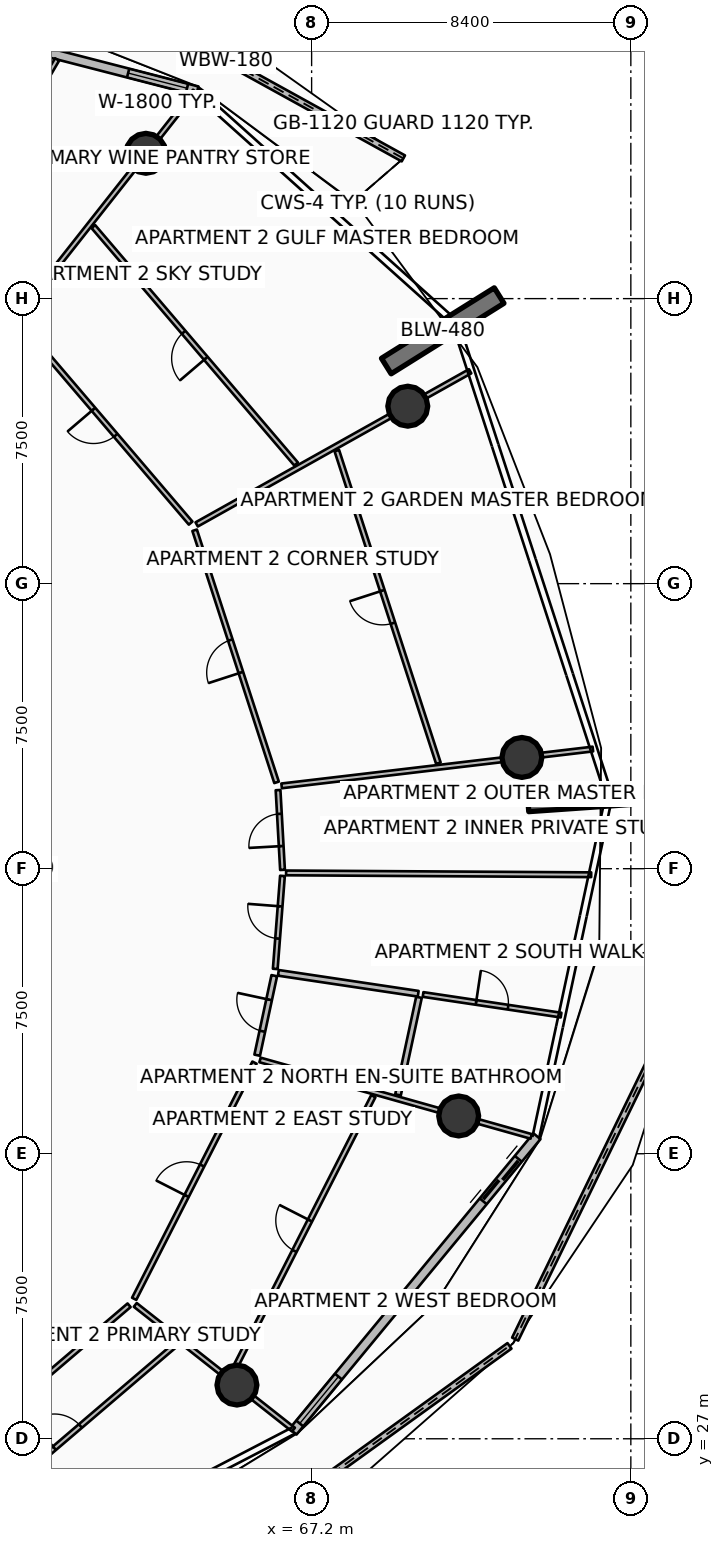
"""IFC4 building model, lengths in metres.
Left out: names, types, materials, properties, quantities, classifications, styles, units other than length and angle.
Written with IfcOpenShell. Run it as: python <this file> out.ifc"""

import sys

from ifc_helpers import new_model, si_unit, direction, frame, frame_2d, origin, origin_2d, place, context, subcontext, project, spatial, polyline, rectangle, circle, outline, extrude, element, fill, save


model = new_model("IFC4")
c1 = context("Model", 3, precision=1e-05, world=origin(), true_north=direction((0.0, 1.0)))
c2 = subcontext(c1, "Body", "Model", "MODEL_VIEW")
j1 = project(units=[si_unit("LENGTHUNIT", "METRE"), si_unit("PLANEANGLEUNIT", "RADIAN")], contexts=[c1])
p1 = place(None, origin())
s1 = spatial("IfcSite", under=j1, at=p1, CompositionType="ELEMENT")
p2 = place(p1, origin())
s2 = spatial("IfcBuilding", under=s1, at=p2, CompositionType="ELEMENT")
p3 = place(p2, frame((0.0, 0.0, 150.3)))
s3 = spatial("IfcBuildingStorey", under=s2, at=p3, CompositionType="ELEMENT", Elevation=150.3)
for number, where, z_axis, x_axis in (
    (1, (69.165, 55.226, 0.0), (0.0, 0.0, 1.0), (0.848, 0.53, 0.0)),
    (2, (72.897, 43.741, 0.0), (0.0, 0.0, 1.0), (0.998, 0.07, 0.0)),
):
    element("IfcWall", number, at=place(p3, frame(where, z_axis=z_axis, x_axis=x_axis)), inside=s3, PredefinedType="SOLIDWALL", context=c2, shape_type="SweptSolid", body=[
        extrude(rectangle(XDim=3.5, YDim=0.48, at=frame_2d((1.75, 0.0))), origin(), (0.0, 0.0, 1.0), 3.75),
    ])
for number, where, z_axis, x_axis in (
    (3, (69.73, 54.169, 0.0), (0.0, 0.0, 1.0), (1.0, 0.0, 0.0)),
    (4, (62.84, 60.824, 0.0), (0.0, 0.0, 1.0), (1.0, 0.0, 0.0)),
    (5, (65.234, 28.414, 0.0), (0.0, 0.0, 1.0), (1.0, 0.0, 0.0)),
    (6, (71.07, 35.494, 0.0), (0.0, 0.0, 1.0), (1.0, 0.0, 0.0)),
    (7, (72.733, 44.927, 0.0), (0.0, 0.0, 1.0), (1.0, 0.0, 0.0)),
):
    element("IfcColumn", number, at=place(p3, frame(where, z_axis=z_axis, x_axis=x_axis)), inside=s3, PredefinedType="COLUMN", context=c2, shape_type="SweptSolid", body=[
        extrude(circle(Radius=0.525, at=origin_2d()), origin(), (0.0, 0.0, 1.0), 3.5),
    ])
p4 = place(p3, frame((69.614, 60.689, 0.0), z_axis=(0.0, 0.0, 1.0), x_axis=(-0.875451711427, 0.483305597897, 0.0)))
e8 = element("IfcWall", 8, at=p4, inside=s3, PredefinedType="PARAPET", context=c2, shape_type="SweptSolid", body=[
    extrude(outline(polyline([(0.0, 0.0), (10.659, 0.0), (10.659, 1.148), (5.33, 1.127), (0.0, 1.224), (0.0, 0.0)])), frame((0.0, 0.09, 0.0), z_axis=(0.0, -1.0, 0.0), x_axis=(1.0, 0.0, 0.0)), (0.0, 0.0, 1.0), 0.18),
])
p5 = place(p3, frame((64.058, 23.43, 0.0), z_axis=(0.0, 0.0, 1.0), x_axis=(0.811363748486, 0.584541587608, 0.0)))
e9 = element("IfcWall", 9, at=p5, inside=s3, PredefinedType="PARAPET", context=c2, shape_type="SweptSolid", body=[
    extrude(outline(polyline([(0.0, 0.0), (10.29, 0.0), (10.29, 1.632), (5.145, 1.418), (0.0, 1.233), (0.0, 0.0)])), frame((0.0, 0.09, 0.0), z_axis=(0.0, -1.0, 0.0), x_axis=(1.0, 0.0, 0.0)), (0.0, 0.0, 1.0), 0.18),
])
p6 = place(p3, frame((72.556, 29.623, 0.0), z_axis=(0.0, 0.0, 1.0), x_axis=(0.437208925246, 0.899359970026, 0.0)))
e10 = element("IfcWall", 10, at=p6, inside=s3, PredefinedType="PARAPET", context=c2, shape_type="SweptSolid", body=[
    extrude(outline(polyline([(0.0, 0.0), (10.992, 0.0), (10.992, 1.86), (5.496, 1.798), (0.0, 1.632), (0.0, 0.0)])), frame((0.0, 0.09, 0.0), z_axis=(0.0, -1.0, 0.0), x_axis=(1.0, 0.0, 0.0)), (0.0, 0.0, 1.0), 0.18),
])
p7 = place(p3, frame((64.192, 62.466, 0.0), z_axis=(0.0, 0.0, 1.0), x_axis=(-0.968379685126, 0.249481032214, 0.0)))
e11 = element("IfcWall", 11, at=p7, inside=s3, PredefinedType="SOLIDWALL", context=c2, shape_type="SweptSolid", body=[
    extrude(rectangle(XDim=10.082, YDim=0.24, at=frame_2d((5.041, 0.0))), origin(), (0.0, 0.0, 1.0), 2.45),
])
p8 = place(p7, frame((7.862, 0.0, 0.0)))
e12 = element("IfcOpeningElement", 12, at=p8, cuts=e11, PredefinedType="OPENING", context=c2, shape_type="SweptSolid", body=[
    extrude(rectangle(XDim=1.45, YDim=2.15, at=frame_2d((0.725, 1.075))), frame((0.0, 0.13, 0.0), z_axis=(0.0, -1.0, 0.0), x_axis=(1.0, 0.0, 0.0)), (0.0, 0.0, 1.0), 0.26),
])
p9 = place(p7, frame((0.28, 0.0, 0.65)))
e13 = element("IfcOpeningElement", 13, at=p9, cuts=e11, PredefinedType="OPENING", context=c2, shape_type="SweptSolid", body=[
    extrude(rectangle(XDim=1.6, YDim=1.5, at=frame_2d((0.8, 0.75))), frame((0.0, 0.13, 0.0), z_axis=(0.0, -1.0, 0.0), x_axis=(1.0, 0.0, 0.0)), (0.0, 0.0, 1.0), 0.26),
])
p10 = place(p3, frame((66.709, 27.187, 0.0), z_axis=(0.0, 0.0, 1.0), x_axis=(0.636771922292, 0.77105221547, 0.0)))
e14 = element("IfcWall", 14, at=p10, inside=s3, PredefinedType="SOLIDWALL", context=c2, shape_type="SweptSolid", body=[
    extrude(rectangle(XDim=10.082, YDim=0.24, at=frame_2d((5.041, 0.0))), origin(), (0.0, 0.0, 1.0), 2.45),
])
p11 = place(p10, frame((7.862, 0.0, 0.0)))
e15 = element("IfcOpeningElement", 15, at=p11, cuts=e14, PredefinedType="OPENING", context=c2, shape_type="SweptSolid", body=[
    extrude(rectangle(XDim=1.45, YDim=2.15, at=frame_2d((0.725, 1.075))), frame((0.0, 0.13, 0.0), z_axis=(0.0, -1.0, 0.0), x_axis=(1.0, 0.0, 0.0)), (0.0, 0.0, 1.0), 0.26),
])
p12 = place(p10, frame((0.28, 0.0, 0.65)))
e16 = element("IfcOpeningElement", 16, at=p12, cuts=e14, PredefinedType="OPENING", context=c2, shape_type="SweptSolid", body=[
    extrude(rectangle(XDim=1.6, YDim=1.5, at=frame_2d((0.8, 0.75))), frame((0.0, 0.13, 0.0), z_axis=(0.0, -1.0, 0.0), x_axis=(1.0, 0.0, 0.0)), (0.0, 0.0, 1.0), 0.26),
])
p13 = place(p3, frame((57.093, 25.983, 0.0), z_axis=(0.0, 0.0, 1.0), x_axis=(0.76040680935, 0.649447060425, 0.0)))
e17 = element("IfcWall", 17, at=p13, inside=s3, PredefinedType="PARTITIONING", context=c2, shape_type="SweptSolid", body=[
    extrude(rectangle(XDim=6.975, YDim=0.125, at=frame_2d((3.487, 0.0))), origin(), (0.0, 0.0, 1.0), 2.94),
])
p14 = place(p13, frame((3.037, 0.0, 0.0)))
e18 = element("IfcOpeningElement", 18, at=p14, cuts=e17, PredefinedType="OPENING", context=c2, shape_type="SweptSolid", body=[
    extrude(rectangle(XDim=0.9, YDim=2.08, at=frame_2d((0.45, 1.04))), frame((0.0, 0.073, 0.0), z_axis=(0.0, -1.0, 0.0), x_axis=(1.0, 0.0, 0.0)), (0.0, 0.0, 1.0), 0.145),
])
p15 = place(p3, frame((57.882, 24.574, 0.0), z_axis=(0.0, 0.0, 1.0), x_axis=(0.760417937401, 0.649434030891, 0.0)))
e19 = element("IfcWall", 19, at=p15, inside=s3, PredefinedType="PARTITIONING", context=c2, shape_type="SweptSolid", body=[
    extrude(rectangle(XDim=7.605, YDim=0.125, at=frame_2d((3.802, 0.0))), origin(), (0.0, 0.0, 1.0), 2.94),
])
p16 = place(p15, frame((3.352, 0.0, 0.0)))
e20 = element("IfcOpeningElement", 20, at=p16, cuts=e19, PredefinedType="OPENING", context=c2, shape_type="SweptSolid", body=[
    extrude(rectangle(XDim=0.9, YDim=2.08, at=frame_2d((0.45, 1.04))), frame((0.0, 0.073, 0.0), z_axis=(0.0, -1.0, 0.0), x_axis=(1.0, 0.0, 0.0)), (0.0, 0.0, 1.0), 0.145),
])
p17 = place(p3, frame((62.559, 30.523, 0.0), z_axis=(0.0, 0.0, 1.0), x_axis=(0.785319981095, -0.619090080112, 0.0)))
e21 = element("IfcWall", 21, at=p17, inside=s3, PredefinedType="PARTITIONING", context=c2, shape_type="SweptSolid", body=[
    extrude(rectangle(XDim=5.301, YDim=0.125, at=frame_2d((2.65, 0.0))), origin(), (0.0, 0.0, 1.0), 2.94),
])
p18 = place(p3, frame((62.531, 30.683, 0.0), z_axis=(0.0, 0.0, 1.0), x_axis=(0.453977694262, 0.891013048789, 0.0)))
e22 = element("IfcWall", 22, at=p18, inside=s3, PredefinedType="PARTITIONING", context=c2, shape_type="SweptSolid", body=[
    extrude(rectangle(XDim=6.974, YDim=0.125, at=frame_2d((3.487, 0.0))), origin(), (0.0, 0.0, 1.0), 2.94),
])
p19 = place(p18, frame((3.037, 0.0, 0.0)))
e23 = element("IfcOpeningElement", 23, at=p19, cuts=e22, PredefinedType="OPENING", context=c2, shape_type="SweptSolid", body=[
    extrude(rectangle(XDim=0.9, YDim=2.08, at=frame_2d((0.45, 1.04))), frame((0.0, 0.073, 0.0), z_axis=(0.0, -1.0, 0.0), x_axis=(1.0, 0.0, 0.0)), (0.0, 0.0, 1.0), 0.145),
])
p20 = place(p3, frame((65.082, 28.671, 0.0), z_axis=(0.0, 0.0, 1.0), x_axis=(0.454001657521, 0.891000838927, 0.0)))
e24 = element("IfcWall", 24, at=p20, inside=s3, PredefinedType="PARTITIONING", context=c2, shape_type="SweptSolid", body=[
    extrude(rectangle(XDim=8.242, YDim=0.125, at=frame_2d((4.121, 0.0))), origin(), (0.0, 0.0, 1.0), 2.94),
])
p21 = place(p20, frame((3.671, 0.0, 0.0)))
e25 = element("IfcOpeningElement", 25, at=p21, cuts=e24, PredefinedType="OPENING", context=c2, shape_type="SweptSolid", body=[
    extrude(rectangle(XDim=0.9, YDim=2.08, at=frame_2d((0.45, 1.04))), frame((0.0, 0.073, 0.0), z_axis=(0.0, -1.0, 0.0), x_axis=(1.0, 0.0, 0.0)), (0.0, 0.0, 1.0), 0.145),
])
p22 = place(p3, frame((65.843, 36.968, 0.0), z_axis=(0.0, 0.0, 1.0), x_axis=(0.962456736489, -0.271435131084, 0.0)))
e26 = element("IfcWall", 26, at=p22, inside=s3, PredefinedType="PARTITIONING", context=c2, shape_type="SweptSolid", body=[
    extrude(rectangle(XDim=7.412, YDim=0.125, at=frame_2d((3.706, 0.0))), origin(), (0.0, 0.0, 1.0), 2.94),
])
p23 = place(p3, frame((65.768, 37.093, 0.0), z_axis=(0.0, 0.0, 1.0), x_axis=(0.210136736931, 0.977672006243, 0.0)))
e27 = element("IfcWall", 27, at=p23, inside=s3, PredefinedType="PARTITIONING", context=c2, shape_type="SweptSolid", body=[
    extrude(rectangle(XDim=2.14, YDim=0.15, at=frame_2d((1.07, 0.0))), origin(), (0.0, 0.0, 1.0), 2.94),
])
p24 = place(p23, frame((0.645, 0.0, 0.0)))
e28 = element("IfcOpeningElement", 28, at=p24, cuts=e27, PredefinedType="OPENING", context=c2, shape_type="SweptSolid", body=[
    extrude(rectangle(XDim=0.85, YDim=2.06, at=frame_2d((0.425, 1.03))), frame((0.0, 0.085, 0.0), z_axis=(0.0, -1.0, 0.0), x_axis=(1.0, 0.0, 0.0)), (0.0, 0.0, 1.0), 0.17),
])
p25 = place(p3, frame((69.473, 36.048, 0.0), z_axis=(0.0, 0.0, 1.0), x_axis=(0.210074988051, 0.97768527625, 0.0)))
e29 = element("IfcWall", 29, at=p25, inside=s3, PredefinedType="PARTITIONING", context=c2, shape_type="SweptSolid", body=[
    extrude(rectangle(XDim=2.626, YDim=0.15, at=frame_2d((1.313, 0.0))), origin(), (0.0, 0.0, 1.0), 2.94),
])
p26 = place(p3, frame((66.325, 39.26, 0.0), z_axis=(0.0, 0.0, 1.0), x_axis=(0.988998843182, -0.147923250997, 0.0)))
e30 = element("IfcWall", 30, at=p26, inside=s3, PredefinedType="PARTITIONING", context=c2, shape_type="SweptSolid", body=[
    extrude(rectangle(XDim=3.72, YDim=0.15, at=frame_2d((1.86, 0.0))), origin(), (0.0, 0.0, 1.0), 2.94),
])
p27 = place(p3, frame((70.133, 38.69, 0.0), z_axis=(0.0, 0.0, 1.0), x_axis=(0.989002592366, -0.147898182183, 0.0)))
e31 = element("IfcWall", 31, at=p27, inside=s3, PredefinedType="PARTITIONING", context=c2, shape_type="SweptSolid", body=[
    extrude(rectangle(XDim=3.671, YDim=0.125, at=frame_2d((1.835, 0.0))), origin(), (0.0, 0.0, 1.0), 2.94),
])
p28 = place(p27, frame((1.411, 0.0, 0.0)))
e32 = element("IfcOpeningElement", 32, at=p28, cuts=e31, PredefinedType="OPENING", context=c2, shape_type="SweptSolid", body=[
    extrude(rectangle(XDim=0.85, YDim=2.06, at=frame_2d((0.425, 1.03))), frame((0.0, 0.073, 0.0), z_axis=(0.0, -1.0, 0.0), x_axis=(1.0, 0.0, 0.0)), (0.0, 0.0, 1.0), 0.145),
])
p29 = place(p3, frame((66.529, 41.889, 0.0), z_axis=(0.0, 0.0, 1.0), x_axis=(0.999982052634, -0.00599119444, 0.0)))
e33 = element("IfcWall", 33, at=p29, inside=s3, PredefinedType="PARTITIONING", context=c2, shape_type="SweptSolid", body=[
    extrude(rectangle(XDim=8.028, YDim=0.125, at=frame_2d((4.014, 0.0))), origin(), (0.0, 0.0, 1.0), 2.94),
])
p30 = place(p3, frame((66.243, 39.363, 0.0), z_axis=(0.0, 0.0, 1.0), x_axis=(0.077198584258, 0.99701573638, 0.0)))
e34 = element("IfcWall", 34, at=p30, inside=s3, PredefinedType="PARTITIONING", context=c2, shape_type="SweptSolid", body=[
    extrude(rectangle(XDim=2.454, YDim=0.125, at=frame_2d((1.227, 0.0))), origin(), (0.0, 0.0, 1.0), 2.94),
])
p31 = place(p30, frame((0.802, 0.0, 0.0)))
e35 = element("IfcOpeningElement", 35, at=p31, cuts=e34, PredefinedType="OPENING", context=c2, shape_type="SweptSolid", body=[
    extrude(rectangle(XDim=0.85, YDim=2.06, at=frame_2d((0.425, 1.03))), frame((0.0, 0.073, 0.0), z_axis=(0.0, -1.0, 0.0), x_axis=(1.0, 0.0, 0.0)), (0.0, 0.0, 1.0), 0.145),
])
p32 = place(p3, frame((66.434, 41.969, 0.0), z_axis=(0.0, 0.0, 1.0), x_axis=(-0.055766005986, 0.998443865511, 0.0)))
e36 = element("IfcWall", 36, at=p32, inside=s3, PredefinedType="PARTITIONING", context=c2, shape_type="SweptSolid", body=[
    extrude(rectangle(XDim=2.101, YDim=0.125, at=frame_2d((1.051, 0.0))), origin(), (0.0, 0.0, 1.0), 2.94),
])
p33 = place(p32, frame((0.626, 0.0, 0.0)))
e37 = element("IfcOpeningElement", 37, at=p33, cuts=e36, PredefinedType="OPENING", context=c2, shape_type="SweptSolid", body=[
    extrude(rectangle(XDim=0.85, YDim=2.06, at=frame_2d((0.425, 1.03))), frame((0.0, 0.073, 0.0), z_axis=(0.0, -1.0, 0.0), x_axis=(1.0, 0.0, 0.0)), (0.0, 0.0, 1.0), 0.145),
])
p34 = place(p3, frame((66.41, 44.179, 0.0), z_axis=(0.0, 0.0, 1.0), x_axis=(0.993070354128, 0.117521367213, 0.0)))
e38 = element("IfcWall", 38, at=p34, inside=s3, PredefinedType="PARTITIONING", context=c2, shape_type="SweptSolid", body=[
    extrude(rectangle(XDim=8.247, YDim=0.125, at=frame_2d((4.124, 0.0))), origin(), (0.0, 0.0, 1.0), 2.94),
])
p35 = place(p3, frame((66.277, 44.272, 0.0), z_axis=(0.0, 0.0, 1.0), x_axis=(-0.308993461661, 0.951064162215, 0.0)))
e39 = element("IfcWall", 39, at=p35, inside=s3, PredefinedType="PARTITIONING", context=c2, shape_type="SweptSolid", body=[
    extrude(rectangle(XDim=6.974, YDim=0.125, at=frame_2d((3.487, 0.0))), origin(), (0.0, 0.0, 1.0), 2.94),
])
p36 = place(p35, frame((3.037, 0.0, 0.0)))
e40 = element("IfcOpeningElement", 40, at=p36, cuts=e39, PredefinedType="OPENING", context=c2, shape_type="SweptSolid", body=[
    extrude(rectangle(XDim=0.9, YDim=2.08, at=frame_2d((0.45, 1.04))), frame((0.0, 0.073, 0.0), z_axis=(0.0, -1.0, 0.0), x_axis=(1.0, 0.0, 0.0)), (0.0, 0.0, 1.0), 0.145),
])
p37 = place(p3, frame((70.535, 44.776, 0.0), z_axis=(0.0, 0.0, 1.0), x_axis=(-0.309002443549, 0.951061244022, 0.0)))
e41 = element("IfcWall", 41, at=p37, inside=s3, PredefinedType="PARTITIONING", context=c2, shape_type="SweptSolid", body=[
    extrude(rectangle(XDim=8.647, YDim=0.125, at=frame_2d((4.324, 0.0))), origin(), (0.0, 0.0, 1.0), 2.94),
])
p38 = place(p37, frame((3.874, 0.0, 0.0)))
e42 = element("IfcOpeningElement", 42, at=p38, cuts=e41, PredefinedType="OPENING", context=c2, shape_type="SweptSolid", body=[
    extrude(rectangle(XDim=0.9, YDim=2.08, at=frame_2d((0.45, 1.04))), frame((0.0, 0.073, 0.0), z_axis=(0.0, -1.0, 0.0), x_axis=(1.0, 0.0, 0.0)), (0.0, 0.0, 1.0), 0.145),
])
p39 = place(p3, frame((64.175, 51.059, 0.0), z_axis=(0.0, 0.0, 1.0), x_axis=(0.872491881101, 0.488628608877, 0.0)))
e43 = element("IfcWall", 43, at=p39, inside=s3, PredefinedType="PARTITIONING", context=c2, shape_type="SweptSolid", body=[
    extrude(rectangle(XDim=8.247, YDim=0.125, at=frame_2d((4.124, 0.0))), origin(), (0.0, 0.0, 1.0), 2.94),
])
p40 = place(p3, frame((64.017, 51.093, 0.0), z_axis=(0.0, 0.0, 1.0), x_axis=(-0.649447060425, 0.76040680935, 0.0)))
e44 = element("IfcWall", 44, at=p40, inside=s3, PredefinedType="PARTITIONING", context=c2, shape_type="SweptSolid", body=[
    extrude(rectangle(XDim=6.975, YDim=0.125, at=frame_2d((3.487, 0.0))), origin(), (0.0, 0.0, 1.0), 2.94),
])
p41 = place(p40, frame((3.037, 0.0, 0.0)))
e45 = element("IfcOpeningElement", 45, at=p41, cuts=e44, PredefinedType="OPENING", context=c2, shape_type="SweptSolid", body=[
    extrude(rectangle(XDim=0.9, YDim=2.08, at=frame_2d((0.45, 1.04))), frame((0.0, 0.073, 0.0), z_axis=(0.0, -1.0, 0.0), x_axis=(1.0, 0.0, 0.0)), (0.0, 0.0, 1.0), 0.145),
])
p42 = place(p3, frame((66.792, 52.648, 0.0), z_axis=(0.0, 0.0, 1.0), x_axis=(-0.649446834215, 0.76040700255, 0.0)))
e46 = element("IfcWall", 46, at=p42, inside=s3, PredefinedType="PARTITIONING", context=c2, shape_type="SweptSolid", body=[
    extrude(rectangle(XDim=8.216, YDim=0.125, at=frame_2d((4.108, 0.0))), origin(), (0.0, 0.0, 1.0), 2.94),
])
p43 = place(p42, frame((3.658, 0.0, 0.0)))
e47 = element("IfcOpeningElement", 47, at=p43, cuts=e46, PredefinedType="OPENING", context=c2, shape_type="SweptSolid", body=[
    extrude(rectangle(XDim=0.9, YDim=2.08, at=frame_2d((0.45, 1.04))), frame((0.0, 0.073, 0.0), z_axis=(0.0, -1.0, 0.0), x_axis=(1.0, 0.0, 0.0)), (0.0, 0.0, 1.0), 0.145),
])
p44 = place(p3, frame((59.477, 56.559, 0.0), z_axis=(0.0, 0.0, 1.0), x_axis=(0.619110986016, 0.785303499925, 0.0)))
e48 = element("IfcWall", 48, at=p44, inside=s3, PredefinedType="PARTITIONING", context=c2, shape_type="SweptSolid", body=[
    extrude(rectangle(XDim=7.513, YDim=0.125, at=frame_2d((3.756, 0.0))), origin(), (0.0, 0.0, 1.0), 2.94),
])
p45 = place(p3, frame((57.382, 57.978, 0.0), z_axis=(0.0, 0.0, 1.0), x_axis=(0.506339561396, 0.862334186128, 0.0)))
e49 = element("IfcWall", 49, at=p45, inside=s3, PredefinedType="PARTITIONING", context=c2, shape_type="SweptSolid", body=[
    extrude(rectangle(XDim=6.163, YDim=0.125, at=frame_2d((3.081, 0.0))), origin(), (0.0, 0.0, 1.0), 2.94),
])
p46 = place(p9, origin())
e50 = element("IfcWindow", 50, at=p46, inside=s3, PartitioningType="SINGLE_PANEL", PredefinedType="WINDOW", context=c2, shape_type="SweptSolid", body=[
    extrude(rectangle(XDim=1.6, YDim=1.5, at=frame_2d((0.8, 0.75))), frame((0.0, 0.03, 0.0), z_axis=(0.0, -1.0, 0.0), x_axis=(1.0, 0.0, 0.0)), (0.0, 0.0, 1.0), 0.06),
])
fill(e13, e50)
p47 = place(p11, origin())
e51 = element("IfcDoor", 51, at=p47, inside=s3, OperationType="DOUBLE_DOOR_SLIDING", PredefinedType="DOOR", context=c2, shape_type="SweptSolid", body=[
    extrude(rectangle(XDim=1.45, YDim=2.15, at=frame_2d((0.725, 1.075))), frame((0.0, 0.025, 0.0), z_axis=(0.0, -1.0, 0.0), x_axis=(1.0, 0.0, 0.0)), (0.0, 0.0, 1.0), 0.05),
])
fill(e15, e51)
p48 = place(p12, origin())
e52 = element("IfcWindow", 52, at=p48, inside=s3, PartitioningType="SINGLE_PANEL", PredefinedType="WINDOW", context=c2, shape_type="SweptSolid", body=[
    extrude(rectangle(XDim=1.6, YDim=1.5, at=frame_2d((0.8, 0.75))), frame((0.0, 0.03, 0.0), z_axis=(0.0, -1.0, 0.0), x_axis=(1.0, 0.0, 0.0)), (0.0, 0.0, 1.0), 0.06),
])
fill(e16, e52)
p49 = place(p16, origin())
e53 = element("IfcDoor", 53, at=p49, inside=s3, OperationType="SINGLE_SWING_LEFT", PredefinedType="DOOR", context=c2, shape_type="SweptSolid", body=[
    extrude(rectangle(XDim=0.9, YDim=2.08, at=frame_2d((0.45, 1.04))), frame((0.0, 0.025, 0.0), z_axis=(0.0, -1.0, 0.0), x_axis=(1.0, 0.0, 0.0)), (0.0, 0.0, 1.0), 0.05),
])
fill(e20, e53)
p50 = place(p19, origin())
e54 = element("IfcDoor", 54, at=p50, inside=s3, OperationType="SINGLE_SWING_LEFT", PredefinedType="DOOR", context=c2, shape_type="SweptSolid", body=[
    extrude(rectangle(XDim=0.9, YDim=2.08, at=frame_2d((0.45, 1.04))), frame((0.0, 0.025, 0.0), z_axis=(0.0, -1.0, 0.0), x_axis=(1.0, 0.0, 0.0)), (0.0, 0.0, 1.0), 0.05),
])
fill(e23, e54)
p51 = place(p21, origin())
e55 = element("IfcDoor", 55, at=p51, inside=s3, OperationType="SINGLE_SWING_RIGHT", PredefinedType="DOOR", context=c2, shape_type="SweptSolid", body=[
    extrude(rectangle(XDim=0.9, YDim=2.08, at=frame_2d((0.45, 1.04))), frame((0.0, 0.025, 0.0), z_axis=(0.0, -1.0, 0.0), x_axis=(1.0, 0.0, 0.0)), (0.0, 0.0, 1.0), 0.05),
])
fill(e25, e55)
p52 = place(p24, origin())
e56 = element("IfcDoor", 56, at=p52, inside=s3, OperationType="SINGLE_SWING_RIGHT", PredefinedType="DOOR", context=c2, shape_type="SweptSolid", body=[
    extrude(rectangle(XDim=0.85, YDim=2.06, at=frame_2d((0.425, 1.03))), frame((0.0, 0.025, 0.0), z_axis=(0.0, -1.0, 0.0), x_axis=(1.0, 0.0, 0.0)), (0.0, 0.0, 1.0), 0.05),
])
fill(e28, e56)
p53 = place(p28, origin())
e57 = element("IfcDoor", 57, at=p53, inside=s3, OperationType="SINGLE_SWING_LEFT", PredefinedType="DOOR", context=c2, shape_type="SweptSolid", body=[
    extrude(rectangle(XDim=0.85, YDim=2.06, at=frame_2d((0.425, 1.03))), frame((0.0, 0.025, 0.0), z_axis=(0.0, -1.0, 0.0), x_axis=(1.0, 0.0, 0.0)), (0.0, 0.0, 1.0), 0.05),
])
fill(e32, e57)
p54 = place(p31, origin())
e58 = element("IfcDoor", 58, at=p54, inside=s3, OperationType="SINGLE_SWING_RIGHT", PredefinedType="DOOR", context=c2, shape_type="SweptSolid", body=[
    extrude(rectangle(XDim=0.85, YDim=2.06, at=frame_2d((0.425, 1.03))), frame((0.0, 0.025, 0.0), z_axis=(0.0, -1.0, 0.0), x_axis=(1.0, 0.0, 0.0)), (0.0, 0.0, 1.0), 0.05),
])
fill(e35, e58)
p55 = place(p33, origin())
e59 = element("IfcDoor", 59, at=p55, inside=s3, OperationType="SINGLE_SWING_LEFT", PredefinedType="DOOR", context=c2, shape_type="SweptSolid", body=[
    extrude(rectangle(XDim=0.85, YDim=2.06, at=frame_2d((0.425, 1.03))), frame((0.0, 0.025, 0.0), z_axis=(0.0, -1.0, 0.0), x_axis=(1.0, 0.0, 0.0)), (0.0, 0.0, 1.0), 0.05),
])
fill(e37, e59)
p56 = place(p36, origin())
e60 = element("IfcDoor", 60, at=p56, inside=s3, OperationType="SINGLE_SWING_LEFT", PredefinedType="DOOR", context=c2, shape_type="SweptSolid", body=[
    extrude(rectangle(XDim=0.9, YDim=2.08, at=frame_2d((0.45, 1.04))), frame((0.0, 0.025, 0.0), z_axis=(0.0, -1.0, 0.0), x_axis=(1.0, 0.0, 0.0)), (0.0, 0.0, 1.0), 0.05),
])
fill(e40, e60)
p57 = place(p38, origin())
e61 = element("IfcDoor", 61, at=p57, inside=s3, OperationType="SINGLE_SWING_RIGHT", PredefinedType="DOOR", context=c2, shape_type="SweptSolid", body=[
    extrude(rectangle(XDim=0.9, YDim=2.08, at=frame_2d((0.45, 1.04))), frame((0.0, 0.025, 0.0), z_axis=(0.0, -1.0, 0.0), x_axis=(1.0, 0.0, 0.0)), (0.0, 0.0, 1.0), 0.05),
])
fill(e42, e61)
p58 = place(p41, origin())
e62 = element("IfcDoor", 62, at=p58, inside=s3, OperationType="SINGLE_SWING_RIGHT", PredefinedType="DOOR", context=c2, shape_type="SweptSolid", body=[
    extrude(rectangle(XDim=0.9, YDim=2.08, at=frame_2d((0.45, 1.04))), frame((0.0, 0.025, 0.0), z_axis=(0.0, -1.0, 0.0), x_axis=(1.0, 0.0, 0.0)), (0.0, 0.0, 1.0), 0.05),
])
fill(e45, e62)
p59 = place(p43, origin())
e63 = element("IfcDoor", 63, at=p59, inside=s3, OperationType="SINGLE_SWING_LEFT", PredefinedType="DOOR", context=c2, shape_type="SweptSolid", body=[
    extrude(rectangle(XDim=0.9, YDim=2.08, at=frame_2d((0.45, 1.04))), frame((0.0, 0.025, 0.0), z_axis=(0.0, -1.0, 0.0), x_axis=(1.0, 0.0, 0.0)), (0.0, 0.0, 1.0), 0.05),
])
fill(e47, e63)
save(model, sys.argv[1])
